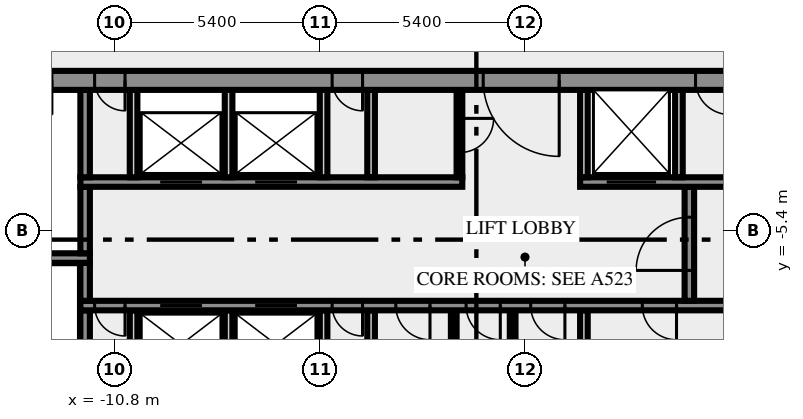
"""IFC4 building model, lengths in metres.
Left out: names, types, materials, properties, quantities, classifications, styles, units other than length and angle.
Written with IfcOpenShell. Run it as: python <this file> out.ifc"""

import sys

from ifc_helpers import new_model, si_unit, direction, frame, frame_2d, origin, place, context, subcontext, project, spatial, rectangle, extrude, element, fill, save


model = new_model("IFC4")
c1 = context("Model", 3, precision=1e-05, world=origin(), true_north=direction((0.0, 1.0)))
c2 = subcontext(c1, "Body", "Model", "MODEL_VIEW")
j1 = project(units=[si_unit("LENGTHUNIT", "METRE"), si_unit("PLANEANGLEUNIT", "RADIAN")], contexts=[c1])
p1 = place(None, origin())
s1 = spatial("IfcSite", under=j1, at=p1, CompositionType="ELEMENT")
p2 = place(p1, origin())
s2 = spatial("IfcBuilding", under=s1, at=p2, CompositionType="ELEMENT")
p3 = place(p2, frame((0.0, 0.0, 331.0)))
s3 = spatial("IfcBuildingStorey", under=s2, at=p3, CompositionType="ELEMENT", Elevation=331.0)
p4 = place(p3, frame((-11.575, -10.5, 0.0), z_axis=(0.0, 0.0, 1.0), x_axis=(0.0, 1.0, 0.0)))
e1 = element("IfcWall", 1, at=p4, inside=s3, PredefinedType="SHEAR", context=c2, shape_type="SweptSolid", body=[
    extrude(rectangle(XDim=3.0, YDim=0.25, at=frame_2d((1.5, 0.0))), origin(), (0.0, 0.0, 1.0), 3.65),
])
for number, where, z_axis, x_axis in (
    (2, (-10.3, -10.5, 0.0), (0.0, 0.0, 1.0), (0.0, 1.0, 0.0)),
    (3, (-7.8, -10.5, 0.0), (0.0, 0.0, 1.0), (0.0, 1.0, 0.0)),
    (4, (-5.3, -10.5, 0.0), (0.0, 0.0, 1.0), (0.0, 1.0, 0.0)),
    (5, (-4.05, -10.5, 0.0), (0.0, 0.0, 1.0), (0.0, 1.0, 0.0)),
):
    element("IfcWall", number, at=place(p3, frame(where, z_axis=z_axis, x_axis=x_axis)), inside=s3, PredefinedType="SOLIDWALL", context=c2, shape_type="SweptSolid", body=[
        extrude(rectangle(XDim=3.0, YDim=0.2, at=frame_2d((1.5, 0.0))), origin(), (0.0, 0.0, 1.0), 3.65),
    ])
for number, where, z_axis, x_axis in (
    (6, (-1.875, -10.5, 0.0), (0.0, 0.0, 1.0), (0.0, 1.0, 0.0)),
    (7, (-0.325, -10.5, 0.0), (0.0, 0.0, 1.0), (0.0, 1.0, 0.0)),
):
    element("IfcWall", number, at=place(p3, frame(where, z_axis=z_axis, x_axis=x_axis)), inside=s3, PredefinedType="PARTITIONING", context=c2, shape_type="SweptSolid", body=[
        extrude(rectangle(XDim=3.0, YDim=0.15, at=frame_2d((1.5, 0.0))), origin(), (0.0, 0.0, 1.0), 3.65),
    ])
p5 = place(p3, frame((1.55, -10.5, 0.0), z_axis=(0.0, 0.0, 1.0), x_axis=(0.0, 1.0, 0.0)))
e8 = element("IfcWall", 8, at=p5, inside=s3, PredefinedType="SOLIDWALL", context=c2, shape_type="SweptSolid", body=[
    extrude(rectangle(XDim=3.0, YDim=0.2, at=frame_2d((1.5, 0.0))), origin(), (0.0, 0.0, 1.0), 3.65),
])
p6 = place(p3, frame((11.7, -7.375, 0.0), z_axis=(0.0, 0.0, 1.0), x_axis=(-1.0, 0.0, 0.0)))
e9 = element("IfcWall", 9, at=p6, inside=s3, PredefinedType="SHEAR", context=c2, shape_type="SweptSolid", body=[
    extrude(rectangle(XDim=23.4, YDim=0.25, at=frame_2d((11.7, 0.0))), origin(), (0.0, 0.0, 1.0), 3.65),
])
p7 = place(p6, frame((22.225, 0.0, 0.0)))
e10 = element("IfcOpeningElement", 10, at=p7, cuts=e9, PredefinedType="OPENING", context=c2, shape_type="SweptSolid", body=[
    extrude(rectangle(XDim=0.8, YDim=2.1, at=frame_2d((0.4, 1.05))), frame((0.0, 0.135, 0.0), z_axis=(0.0, -1.0, 0.0), x_axis=(1.0, 0.0, 0.0)), (0.0, 0.0, 1.0), 0.27),
])
p8 = place(p6, frame((20.2, 0.0, 0.0)))
e11 = element("IfcOpeningElement", 11, at=p8, cuts=e9, PredefinedType="OPENING", context=c2, shape_type="SweptSolid", body=[
    extrude(rectangle(XDim=1.1, YDim=2.1, at=frame_2d((0.55, 1.05))), frame((0.0, 0.135, 0.0), z_axis=(0.0, -1.0, 0.0), x_axis=(1.0, 0.0, 0.0)), (0.0, 0.0, 1.0), 0.27),
])
p9 = place(p6, frame((17.7, 0.0, 0.0)))
e12 = element("IfcOpeningElement", 12, at=p9, cuts=e9, PredefinedType="OPENING", context=c2, shape_type="SweptSolid", body=[
    extrude(rectangle(XDim=1.1, YDim=2.1, at=frame_2d((0.55, 1.05))), frame((0.0, 0.135, 0.0), z_axis=(0.0, -1.0, 0.0), x_axis=(1.0, 0.0, 0.0)), (0.0, 0.0, 1.0), 0.27),
])
p10 = place(p6, frame((15.975, 0.0, 0.0)))
e13 = element("IfcOpeningElement", 13, at=p10, cuts=e9, PredefinedType="OPENING", context=c2, shape_type="SweptSolid", body=[
    extrude(rectangle(XDim=0.8, YDim=2.1, at=frame_2d((0.4, 1.05))), frame((0.0, 0.135, 0.0), z_axis=(0.0, -1.0, 0.0), x_axis=(1.0, 0.0, 0.0)), (0.0, 0.0, 1.0), 0.27),
])
p11 = place(p6, frame((14.2, 0.0, 0.0)))
e14 = element("IfcOpeningElement", 14, at=p11, cuts=e9, PredefinedType="OPENING", context=c2, shape_type="SweptSolid", body=[
    extrude(rectangle(XDim=0.9, YDim=2.1, at=frame_2d((0.45, 1.05))), frame((0.0, 0.135, 0.0), z_axis=(0.0, -1.0, 0.0), x_axis=(1.0, 0.0, 0.0)), (0.0, 0.0, 1.0), 0.27),
])
p12 = place(p6, frame((12.35, 0.0, 0.0)))
e15 = element("IfcOpeningElement", 15, at=p12, cuts=e9, PredefinedType="OPENING", context=c2, shape_type="SweptSolid", body=[
    extrude(rectangle(XDim=0.9, YDim=2.1, at=frame_2d((0.45, 1.05))), frame((0.0, 0.135, 0.0), z_axis=(0.0, -1.0, 0.0), x_axis=(1.0, 0.0, 0.0)), (0.0, 0.0, 1.0), 0.27),
])
p13 = place(p6, frame((10.65, 0.0, 0.0)))
e16 = element("IfcOpeningElement", 16, at=p13, cuts=e9, PredefinedType="OPENING", context=c2, shape_type="SweptSolid", body=[
    extrude(rectangle(XDim=0.9, YDim=2.1, at=frame_2d((0.45, 1.05))), frame((0.0, 0.135, 0.0), z_axis=(0.0, -1.0, 0.0), x_axis=(1.0, 0.0, 0.0)), (0.0, 0.0, 1.0), 0.27),
])
p14 = place(p6, frame((7.713, 0.0, 0.0)))
e17 = element("IfcOpeningElement", 17, at=p14, cuts=e9, PredefinedType="OPENING", context=c2, shape_type="SweptSolid", body=[
    extrude(rectangle(XDim=0.9, YDim=2.1, at=frame_2d((0.45, 1.05))), frame((0.0, 0.135, 0.0), z_axis=(0.0, -1.0, 0.0), x_axis=(1.0, 0.0, 0.0)), (0.0, 0.0, 1.0), 0.27),
])
p15 = place(p6, frame((4.15, 0.0, 0.0)))
e18 = element("IfcOpeningElement", 18, at=p15, cuts=e9, PredefinedType="OPENING", context=c2, shape_type="SweptSolid", body=[
    extrude(rectangle(XDim=0.9, YDim=2.1, at=frame_2d((0.45, 1.05))), frame((0.0, 0.135, 0.0), z_axis=(0.0, -1.0, 0.0), x_axis=(1.0, 0.0, 0.0)), (0.0, 0.0, 1.0), 0.27),
])
p16 = place(p6, frame((1.138, 0.0, 0.0)))
e19 = element("IfcOpeningElement", 19, at=p16, cuts=e9, PredefinedType="OPENING", context=c2, shape_type="SweptSolid", body=[
    extrude(rectangle(XDim=0.9, YDim=2.1, at=frame_2d((0.45, 1.05))), frame((0.0, 0.135, 0.0), z_axis=(0.0, -1.0, 0.0), x_axis=(1.0, 0.0, 0.0)), (0.0, 0.0, 1.0), 0.27),
])
p17 = place(p3, frame((-11.575, -7.25, 0.0), z_axis=(0.0, 0.0, 1.0), x_axis=(0.0, 1.0, 0.0)))
e20 = element("IfcWall", 20, at=p17, inside=s3, PredefinedType="SHEAR", context=c2, shape_type="SweptSolid", body=[
    extrude(rectangle(XDim=1.0, YDim=0.25, at=frame_2d((0.5, 0.0))), origin(), (0.0, 0.0, 1.0), 3.65),
])
p18 = place(p3, frame((4.325, -7.25, 0.0), z_axis=(0.0, 0.0, 1.0), x_axis=(0.0, 1.0, 0.0)))
e21 = element("IfcWall", 21, at=p18, inside=s3, PredefinedType="SHEAR", context=c2, shape_type="SweptSolid", body=[
    extrude(rectangle(XDim=3.0, YDim=0.25, at=frame_2d((1.5, 0.0))), origin(), (0.0, 0.0, 1.0), 3.65),
])
p19 = place(p18, frame((0.8, 0.0, 0.0)))
e22 = element("IfcOpeningElement", 22, at=p19, cuts=e21, PredefinedType="OPENING", context=c2, shape_type="SweptSolid", body=[
    extrude(rectangle(XDim=1.4, YDim=2.1, at=frame_2d((0.7, 1.05))), frame((0.0, 0.135, 0.0), z_axis=(0.0, -1.0, 0.0), x_axis=(1.0, 0.0, 0.0)), (0.0, 0.0, 1.0), 0.27),
])
p20 = place(p3, frame((-11.45, -6.125, 0.0), z_axis=(0.0, 0.0, 1.0), x_axis=(-1.0, 0.0, 0.0)))
e23 = element("IfcWall", 23, at=p20, inside=s3, PredefinedType="SHEAR", context=c2, shape_type="SweptSolid", body=[
    extrude(rectangle(XDim=8.05, YDim=0.25, at=frame_2d((4.025, 0.0))), origin(), (0.0, 0.0, 1.0), 3.65),
])
p21 = place(p20, frame((6.2, 0.0, 0.0)))
e24 = element("IfcOpeningElement", 24, at=p21, cuts=e23, PredefinedType="OPENING", context=c2, shape_type="SweptSolid", body=[
    extrude(rectangle(XDim=1.8, YDim=2.1, at=frame_2d((0.9, 1.05))), frame((0.0, 0.135, 0.0), z_axis=(0.0, -1.0, 0.0), x_axis=(1.0, 0.0, 0.0)), (0.0, 0.0, 1.0), 0.27),
])
p22 = place(p3, frame((-11.575, -6.0, 0.0), z_axis=(0.0, 0.0, 1.0), x_axis=(0.0, 1.0, 0.0)))
e25 = element("IfcWall", 25, at=p22, inside=s3, PredefinedType="SHEAR", context=c2, shape_type="SweptSolid", body=[
    extrude(rectangle(XDim=1.75, YDim=0.25, at=frame_2d((0.875, 0.0))), origin(), (0.0, 0.0, 1.0), 3.65),
])
p23 = place(p3, frame((-11.7, -4.125, 0.0), z_axis=(0.0, 0.0, 1.0), x_axis=(1.0, 0.0, 0.0)))
e26 = element("IfcWall", 26, at=p23, inside=s3, PredefinedType="SHEAR", context=c2, shape_type="SweptSolid", body=[
    extrude(rectangle(XDim=10.05, YDim=0.25, at=frame_2d((5.025, 0.0))), origin(), (0.0, 0.0, 1.0), 3.65),
])
p24 = place(p23, frame((2.1, 0.0, 0.0)))
e27 = element("IfcOpeningElement", 27, at=p24, cuts=e26, PredefinedType="OPENING", context=c2, shape_type="SweptSolid", body=[
    extrude(rectangle(XDim=1.1, YDim=2.1, at=frame_2d((0.55, 1.05))), frame((0.0, 0.135, 0.0), z_axis=(0.0, -1.0, 0.0), x_axis=(1.0, 0.0, 0.0)), (0.0, 0.0, 1.0), 0.27),
])
p25 = place(p23, frame((4.6, 0.0, 0.0)))
e28 = element("IfcOpeningElement", 28, at=p25, cuts=e26, PredefinedType="OPENING", context=c2, shape_type="SweptSolid", body=[
    extrude(rectangle(XDim=1.1, YDim=2.1, at=frame_2d((0.55, 1.05))), frame((0.0, 0.135, 0.0), z_axis=(0.0, -1.0, 0.0), x_axis=(1.0, 0.0, 0.0)), (0.0, 0.0, 1.0), 0.27),
])
p26 = place(p3, frame((1.45, -4.125, 0.0), z_axis=(0.0, 0.0, 1.0), x_axis=(1.0, 0.0, 0.0)))
e29 = element("IfcWall", 29, at=p26, inside=s3, PredefinedType="SHEAR", context=c2, shape_type="SweptSolid", body=[
    extrude(rectangle(XDim=10.25, YDim=0.25, at=frame_2d((5.125, 0.0))), origin(), (0.0, 0.0, 1.0), 3.65),
])
p27 = place(p26, frame((0.7, 0.0, 0.0)))
e30 = element("IfcOpeningElement", 30, at=p27, cuts=e29, PredefinedType="OPENING", context=c2, shape_type="SweptSolid", body=[
    extrude(rectangle(XDim=1.3, YDim=2.1, at=frame_2d((0.65, 1.05))), frame((0.0, 0.135, 0.0), z_axis=(0.0, -1.0, 0.0), x_axis=(1.0, 0.0, 0.0)), (0.0, 0.0, 1.0), 0.27),
])
p28 = place(p3, frame((-11.575, -4.0, 0.0), z_axis=(0.0, 0.0, 1.0), x_axis=(0.0, 1.0, 0.0)))
e31 = element("IfcWall", 31, at=p28, inside=s3, PredefinedType="SHEAR", context=c2, shape_type="SweptSolid", body=[
    extrude(rectangle(XDim=2.3, YDim=0.25, at=frame_2d((1.15, 0.0))), origin(), (0.0, 0.0, 1.0), 3.65),
])
for number, where, z_axis, x_axis in (
    (32, (-10.3, -4.0, 0.0), (0.0, 0.0, 1.0), (0.0, 1.0, 0.0)),
    (33, (-7.8, -4.0, 0.0), (0.0, 0.0, 1.0), (0.0, 1.0, 0.0)),
    (34, (-5.3, -4.0, 0.0), (0.0, 0.0, 1.0), (0.0, 1.0, 0.0)),
    (35, (-4.05, -4.0, 0.0), (0.0, 0.0, 1.0), (0.0, 1.0, 0.0)),
):
    element("IfcWall", number, at=place(p3, frame(where, z_axis=z_axis, x_axis=x_axis)), inside=s3, PredefinedType="SOLIDWALL", context=c2, shape_type="SweptSolid", body=[
        extrude(rectangle(XDim=2.3, YDim=0.2, at=frame_2d((1.15, 0.0))), origin(), (0.0, 0.0, 1.0), 3.65),
    ])
p29 = place(p3, frame((-1.725, -1.7, 0.0), z_axis=(0.0, 0.0, 1.0), x_axis=(0.0, -1.0, 0.0)))
e36 = element("IfcWall", 36, at=p29, inside=s3, PredefinedType="PARTITIONING", context=c2, shape_type="SweptSolid", body=[
    extrude(rectangle(XDim=2.3, YDim=0.15, at=frame_2d((1.15, 0.0))), origin(), (0.0, 0.0, 1.0), 3.65),
])
p30 = place(p29, frame((0.75, 0.0, 0.0)))
e37 = element("IfcOpeningElement", 37, at=p30, cuts=e36, PredefinedType="OPENING", context=c2, shape_type="SweptSolid", body=[
    extrude(rectangle(XDim=0.9, YDim=2.1, at=frame_2d((0.45, 1.05))), frame((0.0, 0.085, 0.0), z_axis=(0.0, -1.0, 0.0), x_axis=(1.0, 0.0, 0.0)), (0.0, 0.0, 1.0), 0.17),
])
for number, where, z_axis, x_axis in (
    (38, (1.55, -4.0, 0.0), (0.0, 0.0, 1.0), (0.0, 1.0, 0.0)),
    (39, (4.05, -4.0, 0.0), (0.0, 0.0, 1.0), (0.0, 1.0, 0.0)),
):
    element("IfcWall", number, at=place(p3, frame(where, z_axis=z_axis, x_axis=x_axis)), inside=s3, PredefinedType="SOLIDWALL", context=c2, shape_type="SweptSolid", body=[
        extrude(rectangle(XDim=2.3, YDim=0.2, at=frame_2d((1.15, 0.0))), origin(), (0.0, 0.0, 1.0), 3.65),
    ])
p31 = place(p3, frame((20.49, -1.45, 0.0), z_axis=(0.0, 0.0, 1.0), x_axis=(-1.0, 0.0, 0.0)))
e40 = element("IfcWall", 40, at=p31, inside=s3, PredefinedType="SHEAR", context=c2, shape_type="SweptSolid", body=[
    extrude(rectangle(XDim=40.98, YDim=0.5, at=frame_2d((20.49, 0.0))), origin(), (0.0, 0.0, 1.0), 3.65),
])
p32 = place(p31, frame((38.14, 0.0, 0.0)))
e41 = element("IfcOpeningElement", 41, at=p32, cuts=e40, PredefinedType="OPENING", context=c2, shape_type="SweptSolid", body=[
    extrude(rectangle(XDim=1.8, YDim=2.1, at=frame_2d((0.9, 1.05))), frame((0.0, 0.26, 0.0), z_axis=(0.0, -1.0, 0.0), x_axis=(1.0, 0.0, 0.0)), (0.0, 0.0, 1.0), 0.52),
])
p33 = place(p31, frame((36.728, 0.0, 0.0)))
e42 = element("IfcOpeningElement", 42, at=p33, cuts=e40, PredefinedType="OPENING", context=c2, shape_type="SweptSolid", body=[
    extrude(rectangle(XDim=0.8, YDim=2.1, at=frame_2d((0.4, 1.05))), frame((0.0, 0.26, 0.0), z_axis=(0.0, -1.0, 0.0), x_axis=(1.0, 0.0, 0.0)), (0.0, 0.0, 1.0), 0.52),
])
p34 = place(p31, frame((35.153, 0.0, 0.0)))
e43 = element("IfcOpeningElement", 43, at=p34, cuts=e40, PredefinedType="OPENING", context=c2, shape_type="SweptSolid", body=[
    extrude(rectangle(XDim=0.8, YDim=2.1, at=frame_2d((0.4, 1.05))), frame((0.0, 0.26, 0.0), z_axis=(0.0, -1.0, 0.0), x_axis=(1.0, 0.0, 0.0)), (0.0, 0.0, 1.0), 0.52),
])
p35 = place(p31, frame((32.94, 0.0, 0.0)))
e44 = element("IfcOpeningElement", 44, at=p35, cuts=e40, PredefinedType="OPENING", context=c2, shape_type="SweptSolid", body=[
    extrude(rectangle(XDim=0.9, YDim=2.1, at=frame_2d((0.45, 1.05))), frame((0.0, 0.26, 0.0), z_axis=(0.0, -1.0, 0.0), x_axis=(1.0, 0.0, 0.0)), (0.0, 0.0, 1.0), 0.52),
])
p36 = place(p31, frame((31.015, 0.0, 0.0)))
e45 = element("IfcOpeningElement", 45, at=p36, cuts=e40, PredefinedType="OPENING", context=c2, shape_type="SweptSolid", body=[
    extrude(rectangle(XDim=0.8, YDim=2.1, at=frame_2d((0.4, 1.05))), frame((0.0, 0.26, 0.0), z_axis=(0.0, -1.0, 0.0), x_axis=(1.0, 0.0, 0.0)), (0.0, 0.0, 1.0), 0.52),
])
p37 = place(p31, frame((24.765, 0.0, 0.0)))
e46 = element("IfcOpeningElement", 46, at=p37, cuts=e40, PredefinedType="OPENING", context=c2, shape_type="SweptSolid", body=[
    extrude(rectangle(XDim=0.8, YDim=2.1, at=frame_2d((0.4, 1.05))), frame((0.0, 0.26, 0.0), z_axis=(0.0, -1.0, 0.0), x_axis=(1.0, 0.0, 0.0)), (0.0, 0.0, 1.0), 0.52),
])
p38 = place(p31, frame((19.59, 0.0, 0.0)))
e47 = element("IfcOpeningElement", 47, at=p38, cuts=e40, PredefinedType="OPENING", context=c2, shape_type="SweptSolid", body=[
    extrude(rectangle(XDim=2.0, YDim=2.1, at=frame_2d((1.0, 1.05))), frame((0.0, 0.26, 0.0), z_axis=(0.0, -1.0, 0.0), x_axis=(1.0, 0.0, 0.0)), (0.0, 0.0, 1.0), 0.52),
])
p39 = place(p31, frame((15.103, 0.0, 0.0)))
e48 = element("IfcOpeningElement", 48, at=p39, cuts=e40, PredefinedType="OPENING", context=c2, shape_type="SweptSolid", body=[
    extrude(rectangle(XDim=0.9, YDim=2.1, at=frame_2d((0.45, 1.05))), frame((0.0, 0.26, 0.0), z_axis=(0.0, -1.0, 0.0), x_axis=(1.0, 0.0, 0.0)), (0.0, 0.0, 1.0), 0.52),
])
p40 = place(p31, frame((13.04, 0.0, 0.0)))
e49 = element("IfcOpeningElement", 49, at=p40, cuts=e40, PredefinedType="OPENING", context=c2, shape_type="SweptSolid", body=[
    extrude(rectangle(XDim=0.9, YDim=2.1, at=frame_2d((0.45, 1.05))), frame((0.0, 0.26, 0.0), z_axis=(0.0, -1.0, 0.0), x_axis=(1.0, 0.0, 0.0)), (0.0, 0.0, 1.0), 0.52),
])
p41 = place(p31, frame((10.177, 0.0, 0.0)))
e50 = element("IfcOpeningElement", 50, at=p41, cuts=e40, PredefinedType="OPENING", context=c2, shape_type="SweptSolid", body=[
    extrude(rectangle(XDim=0.9, YDim=2.1, at=frame_2d((0.45, 1.05))), frame((0.0, 0.26, 0.0), z_axis=(0.0, -1.0, 0.0), x_axis=(1.0, 0.0, 0.0)), (0.0, 0.0, 1.0), 0.52),
])
p42 = place(p31, frame((7.14, 0.0, 0.0)))
e51 = element("IfcOpeningElement", 51, at=p42, cuts=e40, PredefinedType="OPENING", context=c2, shape_type="SweptSolid", body=[
    extrude(rectangle(XDim=0.9, YDim=2.1, at=frame_2d((0.45, 1.05))), frame((0.0, 0.26, 0.0), z_axis=(0.0, -1.0, 0.0), x_axis=(1.0, 0.0, 0.0)), (0.0, 0.0, 1.0), 0.52),
])
p43 = place(p31, frame((4.19, 0.0, 0.0)))
e52 = element("IfcOpeningElement", 52, at=p43, cuts=e40, PredefinedType="OPENING", context=c2, shape_type="SweptSolid", body=[
    extrude(rectangle(XDim=0.9, YDim=2.1, at=frame_2d((0.45, 1.05))), frame((0.0, 0.26, 0.0), z_axis=(0.0, -1.0, 0.0), x_axis=(1.0, 0.0, 0.0)), (0.0, 0.0, 1.0), 0.52),
])
p44 = place(p31, frame((1.04, 0.0, 0.0)))
e53 = element("IfcOpeningElement", 53, at=p44, cuts=e40, PredefinedType="OPENING", context=c2, shape_type="SweptSolid", body=[
    extrude(rectangle(XDim=1.8, YDim=2.1, at=frame_2d((0.9, 1.05))), frame((0.0, 0.26, 0.0), z_axis=(0.0, -1.0, 0.0), x_axis=(1.0, 0.0, 0.0)), (0.0, 0.0, 1.0), 0.52),
])
p45 = place(p7, origin())
e54 = element("IfcDoor", 54, at=p45, inside=s3, OperationType="SINGLE_SWING_RIGHT", PredefinedType="DOOR", context=c2, shape_type="SweptSolid", body=[
    extrude(rectangle(XDim=0.8, YDim=2.1, at=frame_2d((0.4, 1.05))), frame((0.0, 0.025, 0.0), z_axis=(0.0, -1.0, 0.0), x_axis=(1.0, 0.0, 0.0)), (0.0, 0.0, 1.0), 0.05),
])
fill(e10, e54)
p46 = place(p8, origin())
e55 = element("IfcDoor", 55, at=p46, inside=s3, OperationType="DOUBLE_DOOR_SLIDING", PredefinedType="DOOR", context=c2, shape_type="SweptSolid", body=[
    extrude(rectangle(XDim=1.1, YDim=2.1, at=frame_2d((0.55, 1.05))), frame((0.0, 0.025, 0.0), z_axis=(0.0, -1.0, 0.0), x_axis=(1.0, 0.0, 0.0)), (0.0, 0.0, 1.0), 0.05),
])
fill(e11, e55)
p47 = place(p9, origin())
e56 = element("IfcDoor", 56, at=p47, inside=s3, OperationType="DOUBLE_DOOR_SLIDING", PredefinedType="DOOR", context=c2, shape_type="SweptSolid", body=[
    extrude(rectangle(XDim=1.1, YDim=2.1, at=frame_2d((0.55, 1.05))), frame((0.0, 0.025, 0.0), z_axis=(0.0, -1.0, 0.0), x_axis=(1.0, 0.0, 0.0)), (0.0, 0.0, 1.0), 0.05),
])
fill(e12, e56)
p48 = place(p10, origin())
e57 = element("IfcDoor", 57, at=p48, inside=s3, OperationType="SINGLE_SWING_RIGHT", PredefinedType="DOOR", context=c2, shape_type="SweptSolid", body=[
    extrude(rectangle(XDim=0.8, YDim=2.1, at=frame_2d((0.4, 1.05))), frame((0.0, 0.025, 0.0), z_axis=(0.0, -1.0, 0.0), x_axis=(1.0, 0.0, 0.0)), (0.0, 0.0, 1.0), 0.05),
])
fill(e13, e57)
p49 = place(p11, origin())
e58 = element("IfcDoor", 58, at=p49, inside=s3, OperationType="SINGLE_SWING_RIGHT", PredefinedType="DOOR", context=c2, shape_type="SweptSolid", body=[
    extrude(rectangle(XDim=0.9, YDim=2.1, at=frame_2d((0.45, 1.05))), frame((0.0, 0.025, 0.0), z_axis=(0.0, -1.0, 0.0), x_axis=(1.0, 0.0, 0.0)), (0.0, 0.0, 1.0), 0.05),
])
fill(e14, e58)
p50 = place(p12, origin())
e59 = element("IfcDoor", 59, at=p50, inside=s3, OperationType="SINGLE_SWING_RIGHT", PredefinedType="DOOR", context=c2, shape_type="SweptSolid", body=[
    extrude(rectangle(XDim=0.9, YDim=2.1, at=frame_2d((0.45, 1.05))), frame((0.0, 0.025, 0.0), z_axis=(0.0, -1.0, 0.0), x_axis=(1.0, 0.0, 0.0)), (0.0, 0.0, 1.0), 0.05),
])
fill(e15, e59)
p51 = place(p13, origin())
e60 = element("IfcDoor", 60, at=p51, inside=s3, OperationType="SINGLE_SWING_LEFT", PredefinedType="DOOR", context=c2, shape_type="SweptSolid", body=[
    extrude(rectangle(XDim=0.9, YDim=2.1, at=frame_2d((0.45, 1.05))), frame((0.0, 0.025, 0.0), z_axis=(0.0, -1.0, 0.0), x_axis=(1.0, 0.0, 0.0)), (0.0, 0.0, 1.0), 0.05),
])
fill(e16, e60)
p52 = place(p14, origin())
e61 = element("IfcDoor", 61, at=p52, inside=s3, OperationType="SINGLE_SWING_LEFT", PredefinedType="DOOR", context=c2, shape_type="SweptSolid", body=[
    extrude(rectangle(XDim=0.9, YDim=2.1, at=frame_2d((0.45, 1.05))), frame((0.0, 0.025, 0.0), z_axis=(0.0, -1.0, 0.0), x_axis=(1.0, 0.0, 0.0)), (0.0, 0.0, 1.0), 0.05),
])
fill(e17, e61)
p53 = place(p19, origin())
e62 = element("IfcDoor", 62, at=p53, inside=s3, OperationType="DOUBLE_DOOR_SINGLE_SWING", PredefinedType="DOOR", context=c2, shape_type="SweptSolid", body=[
    extrude(rectangle(XDim=1.4, YDim=2.1, at=frame_2d((0.7, 1.05))), frame((0.0, 0.025, 0.0), z_axis=(0.0, -1.0, 0.0), x_axis=(1.0, 0.0, 0.0)), (0.0, 0.0, 1.0), 0.05),
])
fill(e22, e62)
p54 = place(p24, origin())
e63 = element("IfcDoor", 63, at=p54, inside=s3, OperationType="DOUBLE_DOOR_SLIDING", PredefinedType="DOOR", context=c2, shape_type="SweptSolid", body=[
    extrude(rectangle(XDim=1.1, YDim=2.1, at=frame_2d((0.55, 1.05))), frame((0.0, 0.025, 0.0), z_axis=(0.0, -1.0, 0.0), x_axis=(1.0, 0.0, 0.0)), (0.0, 0.0, 1.0), 0.05),
])
fill(e27, e63)
p55 = place(p25, origin())
e64 = element("IfcDoor", 64, at=p55, inside=s3, OperationType="DOUBLE_DOOR_SLIDING", PredefinedType="DOOR", context=c2, shape_type="SweptSolid", body=[
    extrude(rectangle(XDim=1.1, YDim=2.1, at=frame_2d((0.55, 1.05))), frame((0.0, 0.025, 0.0), z_axis=(0.0, -1.0, 0.0), x_axis=(1.0, 0.0, 0.0)), (0.0, 0.0, 1.0), 0.05),
])
fill(e28, e64)
p56 = place(p27, origin())
e65 = element("IfcDoor", 65, at=p56, inside=s3, OperationType="DOUBLE_DOOR_SLIDING", PredefinedType="DOOR", context=c2, shape_type="SweptSolid", body=[
    extrude(rectangle(XDim=1.3, YDim=2.1, at=frame_2d((0.65, 1.05))), frame((0.0, 0.025, 0.0), z_axis=(0.0, -1.0, 0.0), x_axis=(1.0, 0.0, 0.0)), (0.0, 0.0, 1.0), 0.05),
])
fill(e30, e65)
p57 = place(p30, origin())
e66 = element("IfcDoor", 66, at=p57, inside=s3, OperationType="SINGLE_SWING_RIGHT", PredefinedType="DOOR", context=c2, shape_type="SweptSolid", body=[
    extrude(rectangle(XDim=0.9, YDim=2.1, at=frame_2d((0.45, 1.05))), frame((0.0, 0.025, 0.0), z_axis=(0.0, -1.0, 0.0), x_axis=(1.0, 0.0, 0.0)), (0.0, 0.0, 1.0), 0.05),
])
fill(e37, e66)
p58 = place(p36, origin())
e67 = element("IfcDoor", 67, at=p58, inside=s3, OperationType="SINGLE_SWING_RIGHT", PredefinedType="DOOR", context=c2, shape_type="SweptSolid", body=[
    extrude(rectangle(XDim=0.8, YDim=2.1, at=frame_2d((0.4, 1.05))), frame((0.0, 0.025, 0.0), z_axis=(0.0, -1.0, 0.0), x_axis=(1.0, 0.0, 0.0)), (0.0, 0.0, 1.0), 0.05),
])
fill(e45, e67)
p59 = place(p37, origin())
e68 = element("IfcDoor", 68, at=p59, inside=s3, OperationType="SINGLE_SWING_RIGHT", PredefinedType="DOOR", context=c2, shape_type="SweptSolid", body=[
    extrude(rectangle(XDim=0.8, YDim=2.1, at=frame_2d((0.4, 1.05))), frame((0.0, 0.025, 0.0), z_axis=(0.0, -1.0, 0.0), x_axis=(1.0, 0.0, 0.0)), (0.0, 0.0, 1.0), 0.05),
])
fill(e46, e68)
p60 = place(p38, origin())
e69 = element("IfcDoor", 69, at=p60, inside=s3, OperationType="DOUBLE_DOOR_SINGLE_SWING", PredefinedType="DOOR", context=c2, shape_type="SweptSolid", body=[
    extrude(rectangle(XDim=2.0, YDim=2.1, at=frame_2d((1.0, 1.05))), frame((0.0, 0.025, 0.0), z_axis=(0.0, -1.0, 0.0), x_axis=(1.0, 0.0, 0.0)), (0.0, 0.0, 1.0), 0.05),
])
fill(e47, e69)
p61 = place(p39, origin())
e70 = element("IfcDoor", 70, at=p61, inside=s3, OperationType="SINGLE_SWING_LEFT", PredefinedType="DOOR", context=c2, shape_type="SweptSolid", body=[
    extrude(rectangle(XDim=0.9, YDim=2.1, at=frame_2d((0.45, 1.05))), frame((0.0, 0.025, 0.0), z_axis=(0.0, -1.0, 0.0), x_axis=(1.0, 0.0, 0.0)), (0.0, 0.0, 1.0), 0.05),
])
fill(e48, e70)
save(model, sys.argv[1])
